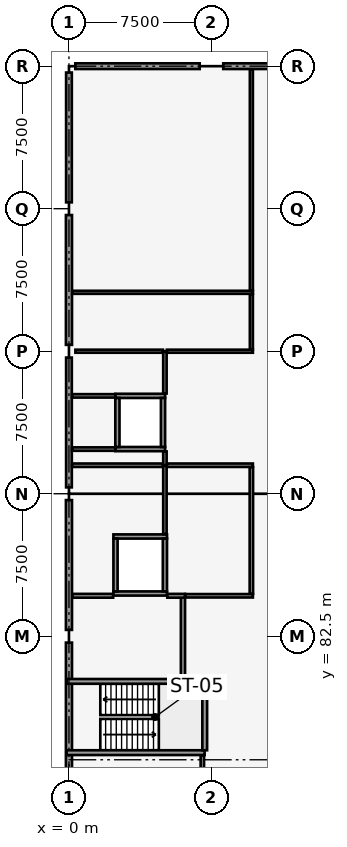
"""IFC4 building model, lengths in metres.
Left out: names, types, materials, properties, quantities, classifications, styles, units other than length and angle.
Written with IfcOpenShell. Run it as: python <this file> out.ifc"""

import sys

from ifc_helpers import new_model, si_unit, direction, frame, frame_2d, origin, origin_2d, place, context, subcontext, project, spatial, rectangle, extrude, element, fill, save


model = new_model("IFC4")
c1 = context("Model", 3, precision=1e-05, world=origin(), true_north=direction((0.0, 1.0)))
c2 = subcontext(c1, "Body", "Model", "MODEL_VIEW")
j1 = project(units=[si_unit("LENGTHUNIT", "METRE"), si_unit("PLANEANGLEUNIT", "RADIAN")], contexts=[c1])
p1 = place(None, origin())
s1 = spatial("IfcSite", under=j1, at=p1, CompositionType="ELEMENT")
p2 = place(p1, origin())
s2 = spatial("IfcBuilding", under=s1, at=p2, CompositionType="ELEMENT")
p3 = place(p2, frame((0.0, 0.0, 4.8)))
s3 = spatial("IfcBuildingStorey", under=s2, at=p3, CompositionType="ELEMENT", Elevation=4.8)
for number, where, z_axis, x_axis in (
    (1, (0.0, 82.5, 0.0), (0.0, 0.0, 1.0), (1.0, 0.0, 0.0)),
    (2, (0.0, 90.0, 0.0), (0.0, 0.0, 1.0), (1.0, 0.0, 0.0)),
    (3, (0.0, 97.5, 0.0), (0.0, 0.0, 1.0), (1.0, 0.0, 0.0)),
    (4, (0.0, 105.0, 0.0), (0.0, 0.0, 1.0), (1.0, 0.0, 0.0)),
    (5, (0.0, 112.5, 0.0), (0.0, 0.0, 1.0), (1.0, 0.0, 0.0)),
):
    element("IfcColumn", number, at=place(p3, frame(where, z_axis=z_axis, x_axis=x_axis)), inside=s3, PredefinedType="COLUMN", context=c2, shape_type="SweptSolid", body=[
        extrude(rectangle(XDim=0.65, YDim=0.65, at=origin_2d()), origin(), (0.0, 0.0, 1.0), 4.2),
    ])
p4 = place(p3, frame((0.0, 101.25, 0.0), z_axis=(0.0, 0.0, 1.0), x_axis=(1.0, 0.0, 0.0)))
e6 = element("IfcColumn", 6, at=p4, inside=s3, PredefinedType="PILASTER", context=c2, shape_type="SweptSolid", body=[
    extrude(rectangle(XDim=0.45, YDim=0.85, at=origin_2d()), origin(), (0.0, 0.0, 1.0), 4.2),
])
p5 = place(p3, frame((0.335, 112.5, 0.0), z_axis=(0.0, 0.0, 1.0), x_axis=(1.0, 0.0, 0.0)))
e7 = element("IfcWall", 7, at=p5, inside=s3, PredefinedType="SOLIDWALL", context=c2, shape_type="SweptSolid", body=[
    extrude(rectangle(XDim=6.545, YDim=0.3, at=frame_2d((3.272, 0.0))), origin(), (0.0, 0.0, 1.0), 2.89),
])
p6 = place(p5, frame((2.715, 0.0, 0.6)))
e8 = element("IfcOpeningElement", 8, at=p6, cuts=e7, PredefinedType="OPENING", context=c2, shape_type="SweptSolid", body=[
    extrude(rectangle(XDim=1.4, YDim=1.8, at=frame_2d((0.7, 0.9))), frame((0.0, 0.16, 0.0), z_axis=(0.0, -1.0, 0.0), x_axis=(1.0, 0.0, 0.0)), (0.0, 0.0, 1.0), 0.32),
])
p7 = place(p3, frame((8.12, 112.5, 0.0), z_axis=(0.0, 0.0, 1.0), x_axis=(1.0, 0.0, 0.0)))
e9 = element("IfcWall", 9, at=p7, inside=s3, PredefinedType="SOLIDWALL", context=c2, shape_type="SweptSolid", body=[
    extrude(rectangle(XDim=6.545, YDim=0.3, at=frame_2d((3.272, 0.0))), origin(), (0.0, 0.0, 1.0), 2.89),
])
p8 = place(p7, frame((2.355, 0.0, 0.6)))
e10 = element("IfcOpeningElement", 10, at=p8, cuts=e9, PredefinedType="OPENING", context=c2, shape_type="SweptSolid", body=[
    extrude(rectangle(XDim=1.55, YDim=1.8, at=frame_2d((0.775, 0.9))), frame((0.0, 0.16, 0.0), z_axis=(0.0, -1.0, 0.0), x_axis=(1.0, 0.0, 0.0)), (0.0, 0.0, 1.0), 0.32),
])
for number, where, z_axis, x_axis in (
    (11, (0.0, 75.335, 0.0), (0.0, 0.0, 1.0), (0.0, 1.0, 0.0)),
    (12, (0.0, 82.835, 0.0), (0.0, 0.0, 1.0), (0.0, 1.0, 0.0)),
):
    element("IfcWall", number, at=place(p3, frame(where, z_axis=z_axis, x_axis=x_axis)), inside=s3, PredefinedType="SOLIDWALL", context=c2, shape_type="SweptSolid", body=[
        extrude(rectangle(XDim=6.83, YDim=0.32, at=frame_2d((3.415, 0.0))), origin(), (0.0, 0.0, 1.0), 2.89),
    ])
p9 = place(p3, frame((0.0, 90.335, 0.0), z_axis=(0.0, 0.0, 1.0), x_axis=(0.0, 1.0, 0.0)))
e13 = element("IfcWall", 13, at=p9, inside=s3, PredefinedType="SOLIDWALL", context=c2, shape_type="SweptSolid", body=[
    extrude(rectangle(XDim=6.83, YDim=0.3, at=frame_2d((3.415, 0.0))), origin(), (0.0, 0.0, 1.0), 2.89),
])
p10 = place(p9, frame((2.49, 0.0, 0.6)))
e14 = element("IfcOpeningElement", 14, at=p10, cuts=e13, PredefinedType="OPENING", context=c2, shape_type="SweptSolid", body=[
    extrude(rectangle(XDim=1.85, YDim=1.8, at=frame_2d((0.925, 0.9))), frame((0.0, 0.16, 0.0), z_axis=(0.0, -1.0, 0.0), x_axis=(1.0, 0.0, 0.0)), (0.0, 0.0, 1.0), 0.32),
])
p11 = place(p9, frame((5.038, 0.0, 0.6)))
e15 = element("IfcOpeningElement", 15, at=p11, cuts=e13, PredefinedType="OPENING", context=c2, shape_type="SweptSolid", body=[
    extrude(rectangle(XDim=1.6, YDim=1.3, at=frame_2d((0.8, 0.65))), frame((0.0, 0.16, 0.0), z_axis=(0.0, -1.0, 0.0), x_axis=(1.0, 0.0, 0.0)), (0.0, 0.0, 1.0), 0.32),
])
p12 = place(p3, frame((0.0, 97.835, 0.0), z_axis=(0.0, 0.0, 1.0), x_axis=(0.0, 1.0, 0.0)))
e16 = element("IfcWall", 16, at=p12, inside=s3, PredefinedType="SOLIDWALL", context=c2, shape_type="SweptSolid", body=[
    extrude(rectangle(XDim=6.83, YDim=0.32, at=frame_2d((3.415, 0.0))), origin(), (0.0, 0.0, 1.0), 2.89),
])
p13 = place(p3, frame((0.0, 105.335, 0.0), z_axis=(0.0, 0.0, 1.0), x_axis=(0.0, 1.0, 0.0)))
e17 = element("IfcWall", 17, at=p13, inside=s3, PredefinedType="SOLIDWALL", context=c2, shape_type="SweptSolid", body=[
    extrude(rectangle(XDim=6.83, YDim=0.3, at=frame_2d((3.415, 0.0))), origin(), (0.0, 0.0, 1.0), 2.89),
])
p14 = place(p3, frame((-0.12, 76.375, 0.0), z_axis=(0.0, 0.0, 1.0), x_axis=(1.0, 0.0, 0.0)))
e18 = element("IfcWall", 18, at=p14, inside=s3, PredefinedType="SOLIDWALL", context=c2, shape_type="SweptSolid", body=[
    extrude(rectangle(XDim=7.26, YDim=0.25, at=frame_2d((3.63, 0.0))), origin(), (0.0, 0.0, 1.0), 3.92),
])
p15 = place(p3, frame((-0.12, 80.125, 0.0), z_axis=(0.0, 0.0, 1.0), x_axis=(1.0, 0.0, 0.0)))
e19 = element("IfcWall", 19, at=p15, inside=s3, PredefinedType="SOLIDWALL", context=c2, shape_type="SweptSolid", body=[
    extrude(rectangle(XDim=7.26, YDim=0.25, at=frame_2d((3.63, 0.0))), origin(), (0.0, 0.0, 1.0), 3.92),
])
p16 = place(p15, frame((0.45, 0.0, 0.0)))
e20 = element("IfcOpeningElement", 20, at=p16, cuts=e19, PredefinedType="OPENING", context=c2, shape_type="SweptSolid", body=[
    extrude(rectangle(XDim=1.1, YDim=2.15, at=frame_2d((0.55, 1.075))), frame((0.0, 0.135, 0.0), z_axis=(0.0, -1.0, 0.0), x_axis=(1.0, 0.0, 0.0)), (0.0, 0.0, 1.0), 0.27),
])
p17 = place(p3, frame((7.145, 76.5, 0.0), z_axis=(0.0, 0.0, 1.0), x_axis=(0.0, 1.0, 0.0)))
e21 = element("IfcWall", 21, at=p17, inside=s3, PredefinedType="SOLIDWALL", context=c2, shape_type="SweptSolid", body=[
    extrude(rectangle(XDim=3.5, YDim=0.25, at=frame_2d((1.75, 0.0))), origin(), (0.0, 0.0, 1.0), 3.92),
])
for number, where, z_axis, x_axis in (
    (22, (2.44, 92.35, 0.0), (0.0, 0.0, 1.0), (1.0, 0.0, 0.0)),
    (23, (2.44, 95.15, 0.0), (0.0, 0.0, 1.0), (1.0, 0.0, 0.0)),
):
    element("IfcWall", number, at=place(p3, frame(where, z_axis=z_axis, x_axis=x_axis)), inside=s3, PredefinedType="SOLIDWALL", context=c2, shape_type="SweptSolid", body=[
        extrude(rectangle(XDim=2.62, YDim=0.22, at=frame_2d((1.31, 0.0))), origin(), (0.0, 0.0, 1.0), 3.92),
    ])
p18 = place(p3, frame((2.55, 92.46, 0.0), z_axis=(0.0, 0.0, 1.0), x_axis=(0.0, 1.0, 0.0)))
e24 = element("IfcWall", 24, at=p18, inside=s3, PredefinedType="SOLIDWALL", context=c2, shape_type="SweptSolid", body=[
    extrude(rectangle(XDim=2.58, YDim=0.22, at=frame_2d((1.29, 0.0))), origin(), (0.0, 0.0, 1.0), 3.92),
])
p19 = place(p3, frame((4.95, 92.46, 0.0), z_axis=(0.0, 0.0, 1.0), x_axis=(0.0, 1.0, 0.0)))
e25 = element("IfcWall", 25, at=p19, inside=s3, PredefinedType="SOLIDWALL", context=c2, shape_type="SweptSolid", body=[
    extrude(rectangle(XDim=2.58, YDim=0.22, at=frame_2d((1.29, 0.0))), origin(), (0.0, 0.0, 1.0), 3.92),
])
p20 = place(p19, frame((0.79, 0.0, 0.0)))
e26 = element("IfcOpeningElement", 26, at=p20, cuts=e25, PredefinedType="OPENING", context=c2, shape_type="SweptSolid", body=[
    extrude(rectangle(XDim=1.0, YDim=2.15, at=frame_2d((0.5, 1.075))), frame((0.0, 0.12, 0.0), z_axis=(0.0, -1.0, 0.0), x_axis=(1.0, 0.0, 0.0)), (0.0, 0.0, 1.0), 0.24),
])
p21 = place(p3, frame((2.34, 84.75, 0.0), z_axis=(0.0, 0.0, 1.0), x_axis=(1.0, 0.0, 0.0)))
e27 = element("IfcWall", 27, at=p21, inside=s3, PredefinedType="SOLIDWALL", context=c2, shape_type="SweptSolid", body=[
    extrude(rectangle(XDim=2.82, YDim=0.22, at=frame_2d((1.41, 0.0))), origin(), (0.0, 0.0, 1.0), 3.92),
])
p22 = place(p21, frame((0.86, 0.0, 0.0)))
e28 = element("IfcOpeningElement", 28, at=p22, cuts=e27, PredefinedType="OPENING", context=c2, shape_type="SweptSolid", body=[
    extrude(rectangle(XDim=1.1, YDim=2.15, at=frame_2d((0.55, 1.075))), frame((0.0, 0.12, 0.0), z_axis=(0.0, -1.0, 0.0), x_axis=(1.0, 0.0, 0.0)), (0.0, 0.0, 1.0), 0.24),
])
p23 = place(p3, frame((2.34, 87.75, 0.0), z_axis=(0.0, 0.0, 1.0), x_axis=(1.0, 0.0, 0.0)))
e29 = element("IfcWall", 29, at=p23, inside=s3, PredefinedType="SOLIDWALL", context=c2, shape_type="SweptSolid", body=[
    extrude(rectangle(XDim=2.82, YDim=0.22, at=frame_2d((1.41, 0.0))), origin(), (0.0, 0.0, 1.0), 3.92),
])
for number, where, z_axis, x_axis in (
    (30, (2.45, 84.86, 0.0), (0.0, 0.0, 1.0), (0.0, 1.0, 0.0)),
    (31, (5.05, 84.86, 0.0), (0.0, 0.0, 1.0), (0.0, 1.0, 0.0)),
):
    element("IfcWall", number, at=place(p3, frame(where, z_axis=z_axis, x_axis=x_axis)), inside=s3, PredefinedType="SOLIDWALL", context=c2, shape_type="SweptSolid", body=[
        extrude(rectangle(XDim=2.78, YDim=0.22, at=frame_2d((1.39, 0.0))), origin(), (0.0, 0.0, 1.0), 3.92),
    ])
p24 = place(p3, frame((6.0, 80.26, 0.0), z_axis=(0.0, 0.0, 1.0), x_axis=(0.0, 1.0, 0.0)))
e32 = element("IfcWall", 32, at=p24, inside=s3, PredefinedType="SOLIDWALL", context=c2, shape_type="SweptSolid", body=[
    extrude(rectangle(XDim=4.37, YDim=0.22, at=frame_2d((2.185, 0.0))), origin(), (0.0, 0.0, 1.0), 3.92),
])
p25 = place(p24, frame((0.45, 0.0, 0.0)))
e33 = element("IfcOpeningElement", 33, at=p25, cuts=e32, PredefinedType="OPENING", context=c2, shape_type="SweptSolid", body=[
    extrude(rectangle(XDim=1.1, YDim=2.15, at=frame_2d((0.55, 1.075))), frame((0.0, 0.12, 0.0), z_axis=(0.0, -1.0, 0.0), x_axis=(1.0, 0.0, 0.0)), (0.0, 0.0, 1.0), 0.24),
])
p26 = place(p3, frame((0.18, 84.63, 0.0), z_axis=(0.0, 0.0, 1.0), x_axis=(1.0, 0.0, 0.0)))
e34 = element("IfcWall", 34, at=p26, inside=s3, PredefinedType="PARTITIONING", context=c2, shape_type="SweptSolid", body=[
    extrude(rectangle(XDim=2.145, YDim=0.2, at=frame_2d((1.073, 0.0))), origin(), (0.0, 0.0, 1.0), 3.15),
])
p27 = place(p3, frame((5.175, 84.63, 0.0), z_axis=(0.0, 0.0, 1.0), x_axis=(1.0, 0.0, 0.0)))
e35 = element("IfcWall", 35, at=p27, inside=s3, PredefinedType="PARTITIONING", context=c2, shape_type="SweptSolid", body=[
    extrude(rectangle(XDim=0.935, YDim=0.2, at=frame_2d((0.468, 0.0))), origin(), (0.0, 0.0, 1.0), 3.6),
])
p28 = place(p3, frame((7.02, 75.0, 0.0), z_axis=(0.0, 0.0, 1.0), x_axis=(0.0, 1.0, 0.0)))
e36 = element("IfcWall", 36, at=p28, inside=s3, PredefinedType="PARTITIONING", context=c2, shape_type="SweptSolid", body=[
    extrude(rectangle(XDim=1.236, YDim=0.18, at=frame_2d((0.618, 0.0))), origin(), (0.0, 0.0, 1.0), 2.89),
])
p29 = place(p3, frame((5.05, 87.874, 0.0), z_axis=(0.0, 0.0, 1.0), x_axis=(0.0, 1.0, 0.0)))
e37 = element("IfcWall", 37, at=p29, inside=s3, PredefinedType="PARTITIONING", context=c2, shape_type="SweptSolid", body=[
    extrude(rectangle(XDim=3.626, YDim=0.18, at=frame_2d((1.813, 0.0))), origin(), (0.0, 0.0, 1.0), 2.89),
])
p30 = place(p3, frame((6.124, 84.63, 0.0), z_axis=(0.0, 0.0, 1.0), x_axis=(1.0, 0.0, 0.0)))
e38 = element("IfcWall", 38, at=p30, inside=s3, PredefinedType="PARTITIONING", context=c2, shape_type="SweptSolid", body=[
    extrude(rectangle(XDim=3.556, YDim=0.18, at=frame_2d((1.778, 0.0))), origin(), (0.0, 0.0, 1.0), 3.27),
])
p31 = place(p3, frame((0.164, 91.5, 0.0), z_axis=(0.0, 0.0, 1.0), x_axis=(1.0, 0.0, 0.0)))
e39 = element("IfcWall", 39, at=p31, inside=s3, PredefinedType="PARTITIONING", context=c2, shape_type="SweptSolid", body=[
    extrude(rectangle(XDim=4.782, YDim=0.18, at=frame_2d((2.391, 0.0))), origin(), (0.0, 0.0, 1.0), 3.27),
])
p32 = place(p3, frame((5.154, 91.5, 0.0), z_axis=(0.0, 0.0, 1.0), x_axis=(1.0, 0.0, 0.0)))
e40 = element("IfcWall", 40, at=p32, inside=s3, PredefinedType="PARTITIONING", context=c2, shape_type="SweptSolid", body=[
    extrude(rectangle(XDim=4.526, YDim=0.18, at=frame_2d((2.263, 0.0))), origin(), (0.0, 0.0, 1.0), 3.27),
])
p33 = place(p3, frame((9.6, 84.734, 0.0), z_axis=(0.0, 0.0, 1.0), x_axis=(0.0, 1.0, 0.0)))
e41 = element("IfcWall", 41, at=p33, inside=s3, PredefinedType="PARTITIONING", context=c2, shape_type="SweptSolid", body=[
    extrude(rectangle(XDim=6.662, YDim=0.18, at=frame_2d((3.331, 0.0))), origin(), (0.0, 0.0, 1.0), 2.89),
])
p34 = place(p33, frame((2.241, 0.0, 0.0)))
e42 = element("IfcOpeningElement", 42, at=p34, cuts=e41, PredefinedType="OPENING", context=c2, shape_type="SweptSolid", body=[
    extrude(rectangle(XDim=1.05, YDim=2.12, at=frame_2d((0.525, 1.06))), frame((0.0, 0.1, 0.0), z_axis=(0.0, -1.0, 0.0), x_axis=(1.0, 0.0, 0.0)), (0.0, 0.0, 1.0), 0.2),
])
for number, where, z_axis, x_axis in (
    (43, (0.164, 92.35, 0.0), (0.0, 0.0, 1.0), (1.0, 0.0, 0.0)),
    (44, (0.164, 95.15, 0.0), (0.0, 0.0, 1.0), (1.0, 0.0, 0.0)),
):
    element("IfcWall", number, at=place(p3, frame(where, z_axis=z_axis, x_axis=x_axis)), inside=s3, PredefinedType="PARTITIONING", context=c2, shape_type="SweptSolid", body=[
        extrude(rectangle(XDim=2.276, YDim=0.18, at=frame_2d((1.138, 0.0))), origin(), (0.0, 0.0, 1.0), 3.27),
    ])
p35 = place(p3, frame((5.05, 91.5, 0.0), z_axis=(0.0, 0.0, 1.0), x_axis=(0.0, 1.0, 0.0)))
e45 = element("IfcWall", 45, at=p35, inside=s3, PredefinedType="PARTITIONING", context=c2, shape_type="SweptSolid", body=[
    extrude(rectangle(XDim=0.726, YDim=0.18, at=frame_2d((0.363, 0.0))), origin(), (0.0, 0.0, 1.0), 3.27),
])
p36 = place(p3, frame((5.05, 95.274, 0.0), z_axis=(0.0, 0.0, 1.0), x_axis=(0.0, 1.0, 0.0)))
e46 = element("IfcWall", 46, at=p36, inside=s3, PredefinedType="PARTITIONING", context=c2, shape_type="SweptSolid", body=[
    extrude(rectangle(XDim=2.226, YDim=0.18, at=frame_2d((1.113, 0.0))), origin(), (0.0, 0.0, 1.0), 2.89),
])
p37 = place(p3, frame((0.339, 97.5, 0.0), z_axis=(0.0, 0.0, 1.0), x_axis=(1.0, 0.0, 0.0)))
e47 = element("IfcWall", 47, at=p37, inside=s3, PredefinedType="PARTITIONING", context=c2, shape_type="SweptSolid", body=[
    extrude(rectangle(XDim=4.607, YDim=0.16, at=frame_2d((2.303, 0.0))), origin(), (0.0, 0.0, 1.0), 2.89),
])
p38 = place(p3, frame((5.154, 97.5, 0.0), z_axis=(0.0, 0.0, 1.0), x_axis=(1.0, 0.0, 0.0)))
e48 = element("IfcWall", 48, at=p38, inside=s3, PredefinedType="PARTITIONING", context=c2, shape_type="SweptSolid", body=[
    extrude(rectangle(XDim=4.526, YDim=0.16, at=frame_2d((2.263, 0.0))), origin(), (0.0, 0.0, 1.0), 2.89),
])
p39 = place(p3, frame((0.174, 100.6, 0.0), z_axis=(0.0, 0.0, 1.0), x_axis=(1.0, 0.0, 0.0)))
e49 = element("IfcWall", 49, at=p39, inside=s3, PredefinedType="PARTITIONING", context=c2, shape_type="SweptSolid", body=[
    extrude(rectangle(XDim=9.506, YDim=0.16, at=frame_2d((4.753, 0.0))), origin(), (0.0, 0.0, 1.0), 3.14),
])
p40 = place(p3, frame((9.6, 97.594, 0.0), z_axis=(0.0, 0.0, 1.0), x_axis=(0.0, 1.0, 0.0)))
e50 = element("IfcWall", 50, at=p40, inside=s3, PredefinedType="PARTITIONING", context=c2, shape_type="SweptSolid", body=[
    extrude(rectangle(XDim=2.912, YDim=0.16, at=frame_2d((1.456, 0.0))), origin(), (0.0, 0.0, 1.0), 2.89),
])
p41 = place(p40, frame((0.981, 0.0, 0.0)))
e51 = element("IfcOpeningElement", 51, at=p41, cuts=e50, PredefinedType="OPENING", context=c2, shape_type="SweptSolid", body=[
    extrude(rectangle(XDim=0.95, YDim=2.1, at=frame_2d((0.475, 1.05))), frame((0.0, 0.09, 0.0), z_axis=(0.0, -1.0, 0.0), x_axis=(1.0, 0.0, 0.0)), (0.0, 0.0, 1.0), 0.18),
])
p42 = place(p3, frame((9.6, 100.694, 0.0), z_axis=(0.0, 0.0, 1.0), x_axis=(0.0, 1.0, 0.0)))
e52 = element("IfcWall", 52, at=p42, inside=s3, PredefinedType="PARTITIONING", context=c2, shape_type="SweptSolid", body=[
    extrude(rectangle(XDim=11.642, YDim=0.16, at=frame_2d((5.821, 0.0))), origin(), (0.0, 0.0, 1.0), 2.89),
])
p43 = place(p42, frame((5.281, 0.0, 0.0)))
e53 = element("IfcOpeningElement", 53, at=p43, cuts=e52, PredefinedType="OPENING", context=c2, shape_type="SweptSolid", body=[
    extrude(rectangle(XDim=1.05, YDim=2.12, at=frame_2d((0.525, 1.06))), frame((0.0, 0.09, 0.0), z_axis=(0.0, -1.0, 0.0), x_axis=(1.0, 0.0, 0.0)), (0.0, 0.0, 1.0), 0.18),
])
p44 = place(p6, origin())
e54 = element("IfcWindow", 54, at=p44, inside=s3, PartitioningType="SINGLE_PANEL", PredefinedType="WINDOW", context=c2, shape_type="SweptSolid", body=[
    extrude(rectangle(XDim=1.4, YDim=1.8, at=frame_2d((0.7, 0.9))), frame((0.0, 0.03, 0.0), z_axis=(0.0, -1.0, 0.0), x_axis=(1.0, 0.0, 0.0)), (0.0, 0.0, 1.0), 0.06),
])
fill(e8, e54)
p45 = place(p10, origin())
e55 = element("IfcWindow", 55, at=p45, inside=s3, PartitioningType="SINGLE_PANEL", PredefinedType="WINDOW", context=c2, shape_type="SweptSolid", body=[
    extrude(rectangle(XDim=1.85, YDim=1.8, at=frame_2d((0.925, 0.9))), frame((0.0, 0.03, 0.0), z_axis=(0.0, -1.0, 0.0), x_axis=(1.0, 0.0, 0.0)), (0.0, 0.0, 1.0), 0.06),
])
fill(e14, e55)
p46 = place(p11, origin())
e56 = element("IfcWindow", 56, at=p46, inside=s3, PartitioningType="SINGLE_PANEL", PredefinedType="WINDOW", context=c2, shape_type="SweptSolid", body=[
    extrude(rectangle(XDim=1.6, YDim=1.3, at=frame_2d((0.8, 0.65))), frame((0.0, 0.03, 0.0), z_axis=(0.0, -1.0, 0.0), x_axis=(1.0, 0.0, 0.0)), (0.0, 0.0, 1.0), 0.06),
])
fill(e15, e56)
p47 = place(p16, origin())
e57 = element("IfcDoor", 57, at=p47, inside=s3, OperationType="SINGLE_SWING_LEFT", PredefinedType="DOOR", context=c2, shape_type="SweptSolid", body=[
    extrude(rectangle(XDim=1.1, YDim=2.15, at=frame_2d((0.55, 1.075))), frame((0.0, 0.025, 0.0), z_axis=(0.0, -1.0, 0.0), x_axis=(1.0, 0.0, 0.0)), (0.0, 0.0, 1.0), 0.05),
])
fill(e20, e57)
p48 = place(p20, origin())
e58 = element("IfcDoor", 58, at=p48, inside=s3, OperationType="SLIDING_TO_LEFT", PredefinedType="DOOR", context=c2, shape_type="SweptSolid", body=[
    extrude(rectangle(XDim=1.0, YDim=2.15, at=frame_2d((0.5, 1.075))), frame((0.0, 0.025, 0.0), z_axis=(0.0, -1.0, 0.0), x_axis=(1.0, 0.0, 0.0)), (0.0, 0.0, 1.0), 0.05),
])
fill(e26, e58)
p49 = place(p22, origin())
e59 = element("IfcDoor", 59, at=p49, inside=s3, OperationType="SLIDING_TO_LEFT", PredefinedType="DOOR", context=c2, shape_type="SweptSolid", body=[
    extrude(rectangle(XDim=1.1, YDim=2.15, at=frame_2d((0.55, 1.075))), frame((0.0, 0.025, 0.0), z_axis=(0.0, -1.0, 0.0), x_axis=(1.0, 0.0, 0.0)), (0.0, 0.0, 1.0), 0.05),
])
fill(e28, e59)
p50 = place(p25, origin())
e60 = element("IfcDoor", 60, at=p50, inside=s3, OperationType="SINGLE_SWING_RIGHT", PredefinedType="DOOR", context=c2, shape_type="SweptSolid", body=[
    extrude(rectangle(XDim=1.1, YDim=2.15, at=frame_2d((0.55, 1.075))), frame((0.0, 0.025, 0.0), z_axis=(0.0, -1.0, 0.0), x_axis=(1.0, 0.0, 0.0)), (0.0, 0.0, 1.0), 0.05),
])
fill(e33, e60)
p51 = place(p34, origin())
e61 = element("IfcDoor", 61, at=p51, inside=s3, OperationType="SINGLE_SWING_LEFT", PredefinedType="DOOR", context=c2, shape_type="SweptSolid", body=[
    extrude(rectangle(XDim=1.05, YDim=2.12, at=frame_2d((0.525, 1.06))), frame((0.0, 0.025, 0.0), z_axis=(0.0, -1.0, 0.0), x_axis=(1.0, 0.0, 0.0)), (0.0, 0.0, 1.0), 0.05),
])
fill(e42, e61)
p52 = place(p41, origin())
e62 = element("IfcDoor", 62, at=p52, inside=s3, OperationType="SINGLE_SWING_RIGHT", PredefinedType="DOOR", context=c2, shape_type="SweptSolid", body=[
    extrude(rectangle(XDim=0.95, YDim=2.1, at=frame_2d((0.475, 1.05))), frame((0.0, 0.025, 0.0), z_axis=(0.0, -1.0, 0.0), x_axis=(1.0, 0.0, 0.0)), (0.0, 0.0, 1.0), 0.05),
])
fill(e51, e62)
p53 = place(p43, origin())
e63 = element("IfcDoor", 63, at=p53, inside=s3, OperationType="SINGLE_SWING_LEFT", PredefinedType="DOOR", context=c2, shape_type="SweptSolid", body=[
    extrude(rectangle(XDim=1.05, YDim=2.12, at=frame_2d((0.525, 1.06))), frame((0.0, 0.025, 0.0), z_axis=(0.0, -1.0, 0.0), x_axis=(1.0, 0.0, 0.0)), (0.0, 0.0, 1.0), 0.05),
])
fill(e53, e63)
save(model, sys.argv[1])
